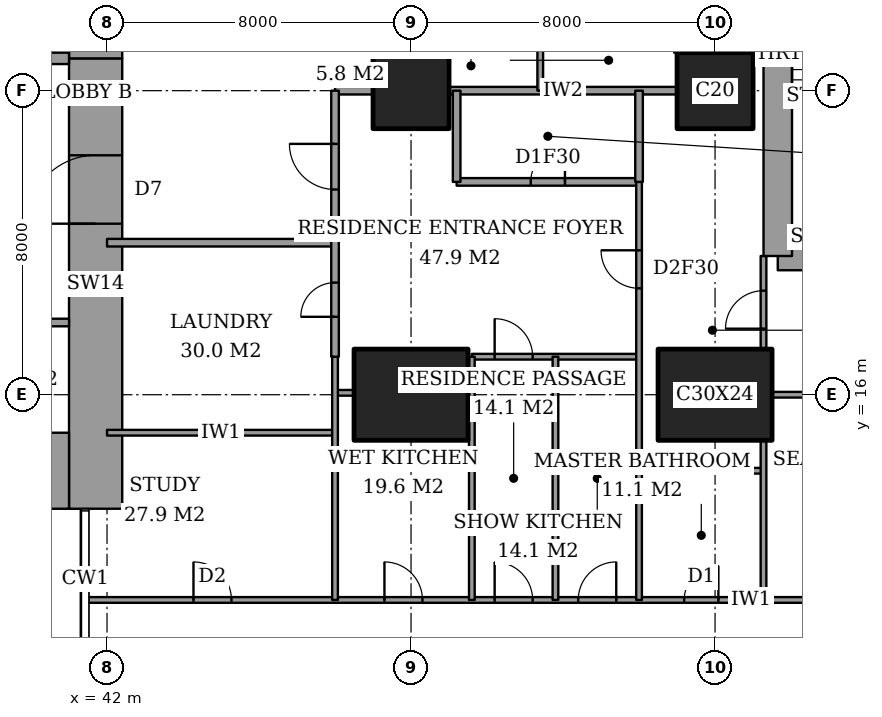
"""IFC4 building model, lengths in metres.
Left out: names, types, materials, properties, quantities, classifications, styles, units other than length and angle.
Written with IfcOpenShell. Run it as: python <this file> out.ifc"""

import sys

from ifc_helpers import new_model, si_unit, direction, frame, frame_2d, origin, origin_2d, place, context, subcontext, project, spatial, rectangle, extrude, element, fill, save


model = new_model("IFC4")
c1 = context("Model", 3, precision=1e-05, world=origin(), true_north=direction((0.0, 1.0)))
c2 = subcontext(c1, "Body", "Model", "MODEL_VIEW")
j1 = project(units=[si_unit("LENGTHUNIT", "METRE"), si_unit("PLANEANGLEUNIT", "RADIAN")], contexts=[c1])
p1 = place(None, origin())
s1 = spatial("IfcSite", under=j1, at=p1, CompositionType="ELEMENT")
p2 = place(p1, origin())
s2 = spatial("IfcBuilding", under=s1, at=p2, CompositionType="ELEMENT")
p3 = place(p2, frame((0.0, 0.0, 72.8)))
s3 = spatial("IfcBuildingStorey", under=s2, at=p3, CompositionType="ELEMENT", Elevation=72.8)
p4 = place(p3, frame((50.0, 16.0, 0.0), z_axis=(0.0, 0.0, 1.0), x_axis=(1.0, 0.0, 0.0)))
e1 = element("IfcColumn", 1, at=p4, inside=s3, PredefinedType="COLUMN", context=c2, shape_type="SweptSolid", body=[
    extrude(rectangle(XDim=3.0, YDim=2.4, at=origin_2d()), origin(), (0.0, 0.0, 1.0), 3.6),
])
p5 = place(p3, frame((50.0, 24.0, 0.0), z_axis=(0.0, 0.0, 1.0), x_axis=(1.0, 0.0, 0.0)))
e2 = element("IfcColumn", 2, at=p5, inside=s3, PredefinedType="COLUMN", context=c2, shape_type="SweptSolid", body=[
    extrude(rectangle(XDim=2.0, YDim=2.0, at=origin_2d()), origin(), (0.0, 0.0, 1.0), 3.6),
])
p6 = place(p3, frame((58.0, 16.0, 0.0), z_axis=(0.0, 0.0, 1.0), x_axis=(1.0, 0.0, 0.0)))
e3 = element("IfcColumn", 3, at=p6, inside=s3, PredefinedType="COLUMN", context=c2, shape_type="SweptSolid", body=[
    extrude(rectangle(XDim=3.0, YDim=2.4, at=origin_2d()), origin(), (0.0, 0.0, 1.0), 3.6),
])
p7 = place(p3, frame((58.0, 24.0, 0.0), z_axis=(0.0, 0.0, 1.0), x_axis=(1.0, 0.0, 0.0)))
e4 = element("IfcColumn", 4, at=p7, inside=s3, PredefinedType="COLUMN", context=c2, shape_type="SweptSolid", body=[
    extrude(rectangle(XDim=2.0, YDim=2.0, at=origin_2d()), origin(), (0.0, 0.0, 1.0), 3.6),
])
p8 = place(p3, frame((37.85, 14.0, 0.0), z_axis=(0.0, 0.0, 1.0), x_axis=(1.0, 0.0, 0.0)))
e5 = element("IfcWall", 5, at=p8, inside=s3, PredefinedType="SHEAR", context=c2, shape_type="SweptSolid", body=[
    extrude(rectangle(XDim=3.15, YDim=2.0, at=frame_2d((1.575, 0.0))), origin(), (0.0, 0.0, 1.0), 3.6),
])
p9 = place(p3, frame((41.7, 13.0, 0.0), z_axis=(0.0, 0.0, 1.0), x_axis=(0.0, 1.0, 0.0)))
e6 = element("IfcWall", 6, at=p9, inside=s3, PredefinedType="SHEAR", context=c2, shape_type="SweptSolid", body=[
    extrude(rectangle(XDim=11.85, YDim=1.4, at=frame_2d((5.925, 0.0))), origin(), (0.0, 0.0, 1.0), 3.6),
])
p10 = place(p9, frame((7.5, 0.0, 0.0)))
e7 = element("IfcOpeningElement", 7, at=p10, cuts=e6, PredefinedType="OPENING", context=c2, shape_type="SweptSolid", body=[
    extrude(rectangle(XDim=1.8, YDim=2.4, at=frame_2d((0.9, 1.2))), frame((0.0, 0.71, 0.0), z_axis=(0.0, -1.0, 0.0), x_axis=(1.0, 0.0, 0.0)), (0.0, 0.0, 1.0), 1.42),
])
p11 = place(p3, frame((41.7, 24.85, 0.0), z_axis=(0.0, 0.0, 1.0), x_axis=(0.0, 1.0, 0.0)))
e8 = element("IfcWall", 8, at=p11, inside=s3, PredefinedType="SHEAR", context=c2, shape_type="SweptSolid", body=[
    extrude(rectangle(XDim=10.15, YDim=1.4, at=frame_2d((5.075, 0.0))), origin(), (0.0, 0.0, 1.0), 3.6),
])
p12 = place(p3, frame((37.85, 24.85, 0.0), z_axis=(0.0, 0.0, 1.0), x_axis=(1.0, 0.0, 0.0)))
e9 = element("IfcWall", 9, at=p12, inside=s3, PredefinedType="SHEAR", context=c2, shape_type="SweptSolid", body=[
    extrude(rectangle(XDim=3.15, YDim=0.3, at=frame_2d((1.575, 0.0))), origin(), (0.0, 0.0, 1.0), 3.6),
])
p13 = place(p12, frame((0.95, 0.0, 0.0)))
e10 = element("IfcOpeningElement", 10, at=p13, cuts=e9, PredefinedType="OPENING", context=c2, shape_type="SweptSolid", body=[
    extrude(rectangle(XDim=1.0, YDim=2.1, at=frame_2d((0.5, 1.05))), frame((0.0, 0.16, 0.0), z_axis=(0.0, -1.0, 0.0), x_axis=(1.0, 0.0, 0.0)), (0.0, 0.0, 1.0), 0.32),
])
p14 = place(p3, frame((59.65, 19.65, 0.0), z_axis=(0.0, 0.0, 1.0), x_axis=(1.0, 0.0, 0.0)))
e11 = element("IfcWall", 11, at=p14, inside=s3, PredefinedType="SHEAR", context=c2, shape_type="SweptSolid", body=[
    extrude(rectangle(XDim=4.45, YDim=0.75, at=frame_2d((2.225, 0.0))), origin(), (0.0, 0.0, 1.0), 3.6),
])
p15 = place(p3, frame((59.65, 28.35, 0.0), z_axis=(0.0, 0.0, 1.0), x_axis=(0.0, -1.0, 0.0)))
e12 = element("IfcWall", 12, at=p15, inside=s3, PredefinedType="SHEAR", context=c2, shape_type="SweptSolid", body=[
    extrude(rectangle(XDim=8.7, YDim=0.75, at=frame_2d((4.35, 0.0))), origin(), (0.0, 0.0, 1.0), 3.6),
])
p16 = place(p15, frame((0.975, 0.0, 0.0)))
e13 = element("IfcOpeningElement", 13, at=p16, cuts=e12, PredefinedType="OPENING", context=c2, shape_type="SweptSolid", body=[
    extrude(rectangle(XDim=1.0, YDim=2.1, at=frame_2d((0.5, 1.05))), frame((0.0, 0.385, 0.0), z_axis=(0.0, -1.0, 0.0), x_axis=(1.0, 0.0, 0.0)), (0.0, 0.0, 1.0), 0.77),
])
p17 = place(p3, frame((41.439, 10.6, 0.0), z_axis=(0.0, 0.0, 1.0), x_axis=(1.0, 0.0, 0.0)))
e14 = element("IfcWall", 14, at=p17, inside=s3, PredefinedType="PARTITIONING", context=c2, shape_type="SweptSolid", body=[
    extrude(rectangle(XDim=25.011, YDim=0.15, at=frame_2d((12.505, 0.0))), origin(), (0.0, 0.0, 1.0), 3.35),
])
p18 = place(p17, frame((10.761, 0.0, 0.0)))
e15 = element("IfcOpeningElement", 15, at=p18, cuts=e14, PredefinedType="OPENING", context=c2, shape_type="SweptSolid", body=[
    extrude(rectangle(XDim=1.0, YDim=2.1, at=frame_2d((0.5, 1.05))), frame((0.0, 0.085, 0.0), z_axis=(0.0, -1.0, 0.0), x_axis=(1.0, 0.0, 0.0)), (0.0, 0.0, 1.0), 0.17),
])
p19 = place(p17, frame((20.924, 0.0, 0.0)))
e16 = element("IfcOpeningElement", 16, at=p19, cuts=e14, PredefinedType="OPENING", context=c2, shape_type="SweptSolid", body=[
    extrude(rectangle(XDim=1.0, YDim=2.1, at=frame_2d((0.5, 1.05))), frame((0.0, 0.085, 0.0), z_axis=(0.0, -1.0, 0.0), x_axis=(1.0, 0.0, 0.0)), (0.0, 0.0, 1.0), 0.17),
])
p20 = place(p17, frame((15.749, 0.0, 0.0)))
e17 = element("IfcOpeningElement", 17, at=p20, cuts=e14, PredefinedType="OPENING", context=c2, shape_type="SweptSolid", body=[
    extrude(rectangle(XDim=0.9, YDim=2.1, at=frame_2d((0.45, 1.05))), frame((0.0, 0.085, 0.0), z_axis=(0.0, -1.0, 0.0), x_axis=(1.0, 0.0, 0.0)), (0.0, 0.0, 1.0), 0.17),
])
p21 = place(p17, frame((12.961, 0.0, 0.0)))
e18 = element("IfcOpeningElement", 18, at=p21, cuts=e14, PredefinedType="OPENING", context=c2, shape_type="SweptSolid", body=[
    extrude(rectangle(XDim=1.0, YDim=2.1, at=frame_2d((0.5, 1.05))), frame((0.0, 0.085, 0.0), z_axis=(0.0, -1.0, 0.0), x_axis=(1.0, 0.0, 0.0)), (0.0, 0.0, 1.0), 0.17),
])
p22 = place(p17, frame((7.861, 0.0, 0.0)))
e19 = element("IfcOpeningElement", 19, at=p22, cuts=e14, PredefinedType="OPENING", context=c2, shape_type="SweptSolid", body=[
    extrude(rectangle(XDim=1.0, YDim=2.1, at=frame_2d((0.5, 1.05))), frame((0.0, 0.085, 0.0), z_axis=(0.0, -1.0, 0.0), x_axis=(1.0, 0.0, 0.0)), (0.0, 0.0, 1.0), 0.17),
])
p23 = place(p17, frame((2.836, 0.0, 0.0)))
e20 = element("IfcOpeningElement", 20, at=p23, cuts=e14, PredefinedType="OPENING", context=c2, shape_type="SweptSolid", body=[
    extrude(rectangle(XDim=1.0, YDim=2.1, at=frame_2d((0.5, 1.05))), frame((0.0, 0.085, 0.0), z_axis=(0.0, -1.0, 0.0), x_axis=(1.0, 0.0, 0.0)), (0.0, 0.0, 1.0), 0.17),
])
p24 = place(p3, frame((56.0, 14.0, 0.0), z_axis=(0.0, 0.0, 1.0), x_axis=(1.0, 0.0, 0.0)))
e21 = element("IfcWall", 21, at=p24, inside=s3, PredefinedType="PARTITIONING", context=c2, shape_type="SweptSolid", body=[
    extrude(rectangle(XDim=3.275, YDim=0.15, at=frame_2d((1.637, 0.0))), origin(), (0.0, 0.0, 1.0), 3.35),
])
p25 = place(p3, frame((42.0, 15.0, 0.0), z_axis=(0.0, 0.0, 1.0), x_axis=(1.0, 0.0, 0.0)))
e22 = element("IfcWall", 22, at=p25, inside=s3, PredefinedType="PARTITIONING", context=c2, shape_type="SweptSolid", body=[
    extrude(rectangle(XDim=6.0, YDim=0.15, at=frame_2d((3.0, 0.0))), origin(), (0.0, 0.0, 1.0), 3.35),
])
p26 = place(p3, frame((59.5, 16.0, 0.0), z_axis=(0.0, 0.0, 1.0), x_axis=(1.0, 0.0, 0.0)))
e23 = element("IfcWall", 23, at=p26, inside=s3, PredefinedType="PARTITIONING", context=c2, shape_type="SweptSolid", body=[
    extrude(rectangle(XDim=5.15, YDim=0.15, at=frame_2d((2.575, 0.0))), origin(), (0.0, 0.0, 1.0), 2.634),
])
p27 = place(p3, frame((48.0, 16.05, 0.0), z_axis=(0.0, 0.0, 1.0), x_axis=(1.0, 0.0, 0.0)))
e24 = element("IfcWall", 24, at=p27, inside=s3, PredefinedType="PARTITIONING", context=c2, shape_type="SweptSolid", body=[
    extrude(rectangle(XDim=0.5, YDim=0.15, at=frame_2d((0.25, 0.0))), origin(), (0.0, 0.0, 1.0), 2.634),
])
p28 = place(p3, frame((51.6, 17.0, 0.0), z_axis=(0.0, 0.0, 1.0), x_axis=(1.0, 0.0, 0.0)))
e25 = element("IfcWall", 25, at=p28, inside=s3, PredefinedType="PARTITIONING", context=c2, shape_type="SweptSolid", body=[
    extrude(rectangle(XDim=4.4, YDim=0.15, at=frame_2d((2.2, 0.0))), origin(), (0.0, 0.0, 1.0), 3.35),
])
p29 = place(p28, frame((0.6, 0.0, 0.0)))
e26 = element("IfcOpeningElement", 26, at=p29, cuts=e25, PredefinedType="OPENING", context=c2, shape_type="SweptSolid", body=[
    extrude(rectangle(XDim=1.0, YDim=2.1, at=frame_2d((0.5, 1.05))), frame((0.0, 0.085, 0.0), z_axis=(0.0, -1.0, 0.0), x_axis=(1.0, 0.0, 0.0)), (0.0, 0.0, 1.0), 0.17),
])
p30 = place(p3, frame((42.0, 20.0, 0.0), z_axis=(0.0, 0.0, 1.0), x_axis=(1.0, 0.0, 0.0)))
e27 = element("IfcWall", 27, at=p30, inside=s3, PredefinedType="PARTITIONING", context=c2, shape_type="SweptSolid", body=[
    extrude(rectangle(XDim=6.0, YDim=0.2, at=frame_2d((3.0, 0.0))), origin(), (0.0, 0.0, 1.0), 3.35),
])
p31 = place(p3, frame((51.2, 21.6, 0.0), z_axis=(0.0, 0.0, 1.0), x_axis=(1.0, 0.0, 0.0)))
e28 = element("IfcWall", 28, at=p31, inside=s3, PredefinedType="PARTITIONING", context=c2, shape_type="SweptSolid", body=[
    extrude(rectangle(XDim=4.8, YDim=0.2, at=frame_2d((2.4, 0.0))), origin(), (0.0, 0.0, 1.0), 3.35),
])
p32 = place(p31, frame((1.95, 0.0, 0.0)))
e29 = element("IfcOpeningElement", 29, at=p32, cuts=e28, PredefinedType="OPENING", context=c2, shape_type="SweptSolid", body=[
    extrude(rectangle(XDim=0.9, YDim=2.1, at=frame_2d((0.45, 1.05))), frame((0.0, 0.11, 0.0), z_axis=(0.0, -1.0, 0.0), x_axis=(1.0, 0.0, 0.0)), (0.0, 0.0, 1.0), 0.22),
])
p33 = place(p3, frame((48.0, 24.0, 0.0), z_axis=(0.0, 0.0, 1.0), x_axis=(1.0, 0.0, 0.0)))
e30 = element("IfcWall", 30, at=p33, inside=s3, PredefinedType="PARTITIONING", context=c2, shape_type="SweptSolid", body=[
    extrude(rectangle(XDim=1.0, YDim=0.2, at=frame_2d((0.5, 0.0))), origin(), (0.0, 0.0, 1.0), 3.35),
])
p34 = place(p3, frame((51.0, 24.0, 0.0), z_axis=(0.0, 0.0, 1.0), x_axis=(1.0, 0.0, 0.0)))
e31 = element("IfcWall", 31, at=p34, inside=s3, PredefinedType="PARTITIONING", context=c2, shape_type="SweptSolid", body=[
    extrude(rectangle(XDim=6.0, YDim=0.2, at=frame_2d((3.0, 0.0))), origin(), (0.0, 0.0, 1.0), 3.35),
])
p35 = place(p3, frame((48.0, 17.0, 0.0), z_axis=(0.0, 0.0, 1.0), x_axis=(0.0, 1.0, 0.0)))
e32 = element("IfcWall", 32, at=p35, inside=s3, PredefinedType="PARTITIONING", context=c2, shape_type="SweptSolid", body=[
    extrude(rectangle(XDim=7.0, YDim=0.2, at=frame_2d((3.5, 0.0))), origin(), (0.0, 0.0, 1.0), 3.35),
])
p36 = place(p35, frame((4.4, 0.0, 0.0)))
e33 = element("IfcOpeningElement", 33, at=p36, cuts=e32, PredefinedType="OPENING", context=c2, shape_type="SweptSolid", body=[
    extrude(rectangle(XDim=1.2, YDim=2.4, at=frame_2d((0.6, 1.2))), frame((0.0, 0.11, 0.0), z_axis=(0.0, -1.0, 0.0), x_axis=(1.0, 0.0, 0.0)), (0.0, 0.0, 1.0), 0.22),
])
p37 = place(p35, frame((1.05, 0.0, 0.0)))
e34 = element("IfcOpeningElement", 34, at=p37, cuts=e32, PredefinedType="OPENING", context=c2, shape_type="SweptSolid", body=[
    extrude(rectangle(XDim=0.9, YDim=2.1, at=frame_2d((0.45, 1.05))), frame((0.0, 0.11, 0.0), z_axis=(0.0, -1.0, 0.0), x_axis=(1.0, 0.0, 0.0)), (0.0, 0.0, 1.0), 0.22),
])
p38 = place(p3, frame((48.0, 10.6, 0.0), z_axis=(0.0, 0.0, 1.0), x_axis=(0.0, 1.0, 0.0)))
e35 = element("IfcWall", 35, at=p38, inside=s3, PredefinedType="PARTITIONING", context=c2, shape_type="SweptSolid", body=[
    extrude(rectangle(XDim=6.4, YDim=0.15, at=frame_2d((3.2, 0.0))), origin(), (0.0, 0.0, 1.0), 3.35),
])
p39 = place(p3, frame((51.2, 21.6, 0.0), z_axis=(0.0, 0.0, 1.0), x_axis=(0.0, 1.0, 0.0)))
e36 = element("IfcWall", 36, at=p39, inside=s3, PredefinedType="PARTITIONING", context=c2, shape_type="SweptSolid", body=[
    extrude(rectangle(XDim=2.4, YDim=0.2, at=frame_2d((1.2, 0.0))), origin(), (0.0, 0.0, 1.0), 3.35),
])
p40 = place(p3, frame((51.6, 10.6, 0.0), z_axis=(0.0, 0.0, 1.0), x_axis=(0.0, 1.0, 0.0)))
e37 = element("IfcWall", 37, at=p40, inside=s3, PredefinedType="PARTITIONING", context=c2, shape_type="SweptSolid", body=[
    extrude(rectangle(XDim=6.4, YDim=0.15, at=frame_2d((3.2, 0.0))), origin(), (0.0, 0.0, 1.0), 3.35),
])
p41 = place(p3, frame((53.4, 24.0, 0.0), z_axis=(0.0, 0.0, 1.0), x_axis=(0.0, 1.0, 0.0)))
e38 = element("IfcWall", 38, at=p41, inside=s3, PredefinedType="PARTITIONING", context=c2, shape_type="SweptSolid", body=[
    extrude(rectangle(XDim=1.6, YDim=0.15, at=frame_2d((0.8, 0.0))), origin(), (0.0, 0.0, 1.0), 3.35),
])
p42 = place(p3, frame((53.8, 10.6, 0.0), z_axis=(0.0, 0.0, 1.0), x_axis=(0.0, 1.0, 0.0)))
e39 = element("IfcWall", 39, at=p42, inside=s3, PredefinedType="PARTITIONING", context=c2, shape_type="SweptSolid", body=[
    extrude(rectangle(XDim=6.4, YDim=0.15, at=frame_2d((3.2, 0.0))), origin(), (0.0, 0.0, 1.0), 3.35),
])
p43 = place(p3, frame((56.0, 21.6, 0.0), z_axis=(0.0, 0.0, 1.0), x_axis=(0.0, 1.0, 0.0)))
e40 = element("IfcWall", 40, at=p43, inside=s3, PredefinedType="PARTITIONING", context=c2, shape_type="SweptSolid", body=[
    extrude(rectangle(XDim=2.4, YDim=0.2, at=frame_2d((1.2, 0.0))), origin(), (0.0, 0.0, 1.0), 3.35),
])
p44 = place(p3, frame((56.0, 10.6, 0.0), z_axis=(0.0, 0.0, 1.0), x_axis=(0.0, 1.0, 0.0)))
e41 = element("IfcWall", 41, at=p44, inside=s3, PredefinedType="PARTITIONING", context=c2, shape_type="SweptSolid", body=[
    extrude(rectangle(XDim=11.0, YDim=0.15, at=frame_2d((5.5, 0.0))), origin(), (0.0, 0.0, 1.0), 3.35),
])
p45 = place(p44, frame((8.2, 0.0, 0.0)))
e42 = element("IfcOpeningElement", 42, at=p45, cuts=e41, PredefinedType="OPENING", context=c2, shape_type="SweptSolid", body=[
    extrude(rectangle(XDim=1.0, YDim=2.1, at=frame_2d((0.5, 1.05))), frame((0.0, 0.085, 0.0), z_axis=(0.0, -1.0, 0.0), x_axis=(1.0, 0.0, 0.0)), (0.0, 0.0, 1.0), 0.17),
])
p46 = place(p3, frame((59.275, 10.6, 0.0), z_axis=(0.0, 0.0, 1.0), x_axis=(0.0, 1.0, 0.0)))
e43 = element("IfcWall", 43, at=p46, inside=s3, PredefinedType="PARTITIONING", context=c2, shape_type="SweptSolid", body=[
    extrude(rectangle(XDim=4.2, YDim=0.15, at=frame_2d((2.1, 0.0))), origin(), (0.0, 0.0, 1.0), 3.35),
])
p47 = place(p3, frame((59.275, 17.2, 0.0), z_axis=(0.0, 0.0, 1.0), x_axis=(0.0, 1.0, 0.0)))
e44 = element("IfcWall", 44, at=p47, inside=s3, PredefinedType="PARTITIONING", context=c2, shape_type="SweptSolid", body=[
    extrude(rectangle(XDim=2.45, YDim=0.15, at=frame_2d((1.225, 0.0))), origin(), (0.0, 0.0, 1.0), 3.35),
])
p48 = place(p47, frame((0.538, 0.0, 0.0)))
e45 = element("IfcOpeningElement", 45, at=p48, cuts=e44, PredefinedType="OPENING", context=c2, shape_type="SweptSolid", body=[
    extrude(rectangle(XDim=1.0, YDim=2.1, at=frame_2d((0.5, 1.05))), frame((0.0, 0.085, 0.0), z_axis=(0.0, -1.0, 0.0), x_axis=(1.0, 0.0, 0.0)), (0.0, 0.0, 1.0), 0.17),
])
p49 = place(p3, frame((28.3, 17.9, 0.0), z_axis=(0.0, 0.0, 1.0), x_axis=(1.0, 0.0, 0.0)))
e46 = element("IfcWall", 46, at=p49, inside=s3, PredefinedType="PARTITIONING", context=c2, shape_type="SweptSolid", body=[
    extrude(rectangle(XDim=12.7, YDim=0.2, at=frame_2d((6.35, 0.0))), origin(), (0.0, 0.0, 1.0), 3.6),
])
p50 = place(p49, frame((0.95, 0.0, 0.0)))
e47 = element("IfcOpeningElement", 47, at=p50, cuts=e46, PredefinedType="OPENING", context=c2, shape_type="SweptSolid", body=[
    extrude(rectangle(XDim=1.1, YDim=2.1, at=frame_2d((0.55, 1.05))), frame((0.0, 0.11, 0.0), z_axis=(0.0, -1.0, 0.0), x_axis=(1.0, 0.0, 0.0)), (0.0, 0.0, 1.0), 0.22),
])
p51 = place(p49, frame((4.15, 0.0, 0.0)))
e48 = element("IfcOpeningElement", 48, at=p51, cuts=e46, PredefinedType="OPENING", context=c2, shape_type="SweptSolid", body=[
    extrude(rectangle(XDim=1.1, YDim=2.1, at=frame_2d((0.55, 1.05))), frame((0.0, 0.11, 0.0), z_axis=(0.0, -1.0, 0.0), x_axis=(1.0, 0.0, 0.0)), (0.0, 0.0, 1.0), 0.22),
])
p52 = place(p49, frame((7.35, 0.0, 0.0)))
e49 = element("IfcOpeningElement", 49, at=p52, cuts=e46, PredefinedType="OPENING", context=c2, shape_type="SweptSolid", body=[
    extrude(rectangle(XDim=1.1, YDim=2.1, at=frame_2d((0.55, 1.05))), frame((0.0, 0.11, 0.0), z_axis=(0.0, -1.0, 0.0), x_axis=(1.0, 0.0, 0.0)), (0.0, 0.0, 1.0), 0.22),
])
p53 = place(p49, frame((10.6, 0.0, 0.0)))
e50 = element("IfcOpeningElement", 50, at=p53, cuts=e46, PredefinedType="OPENING", context=c2, shape_type="SweptSolid", body=[
    extrude(rectangle(XDim=1.2, YDim=2.1, at=frame_2d((0.6, 1.05))), frame((0.0, 0.11, 0.0), z_axis=(0.0, -1.0, 0.0), x_axis=(1.0, 0.0, 0.0)), (0.0, 0.0, 1.0), 0.22),
])
p54 = place(p18, origin())
e51 = element("IfcDoor", 51, at=p54, inside=s3, OperationType="SINGLE_SWING_RIGHT", PredefinedType="DOOR", context=c2, shape_type="SweptSolid", body=[
    extrude(rectangle(XDim=1.0, YDim=2.1, at=frame_2d((0.5, 1.05))), frame((0.0, 0.025, 0.0), z_axis=(0.0, -1.0, 0.0), x_axis=(1.0, 0.0, 0.0)), (0.0, 0.0, 1.0), 0.05),
])
fill(e15, e51)
p55 = place(p48, origin())
e52 = element("IfcDoor", 52, at=p55, inside=s3, OperationType="SINGLE_SWING_RIGHT", PredefinedType="DOOR", context=c2, shape_type="SweptSolid", body=[
    extrude(rectangle(XDim=1.0, YDim=2.1, at=frame_2d((0.5, 1.05))), frame((0.0, 0.025, 0.0), z_axis=(0.0, -1.0, 0.0), x_axis=(1.0, 0.0, 0.0)), (0.0, 0.0, 1.0), 0.05),
])
fill(e45, e52)
p56 = place(p20, origin())
e53 = element("IfcDoor", 53, at=p56, inside=s3, OperationType="SINGLE_SWING_LEFT", PredefinedType="DOOR", context=c2, shape_type="SweptSolid", body=[
    extrude(rectangle(XDim=0.9, YDim=2.1, at=frame_2d((0.45, 1.05))), frame((0.0, 0.025, 0.0), z_axis=(0.0, -1.0, 0.0), x_axis=(1.0, 0.0, 0.0)), (0.0, 0.0, 1.0), 0.05),
])
fill(e17, e53)
p57 = place(p45, origin())
e54 = element("IfcDoor", 54, at=p57, inside=s3, OperationType="SINGLE_SWING_LEFT", PredefinedType="DOOR", context=c2, shape_type="SweptSolid", body=[
    extrude(rectangle(XDim=1.0, YDim=2.1, at=frame_2d((0.5, 1.05))), frame((0.0, 0.025, 0.0), z_axis=(0.0, -1.0, 0.0), x_axis=(1.0, 0.0, 0.0)), (0.0, 0.0, 1.0), 0.05),
])
fill(e42, e54)
p58 = place(p32, origin())
e55 = element("IfcDoor", 55, at=p58, inside=s3, OperationType="SINGLE_SWING_LEFT", PredefinedType="DOOR", context=c2, shape_type="SweptSolid", body=[
    extrude(rectangle(XDim=0.9, YDim=2.1, at=frame_2d((0.45, 1.05))), frame((0.0, 0.025, 0.0), z_axis=(0.0, -1.0, 0.0), x_axis=(1.0, 0.0, 0.0)), (0.0, 0.0, 1.0), 0.05),
])
fill(e29, e55)
p59 = place(p36, origin())
e56 = element("IfcDoor", 56, at=p59, inside=s3, OperationType="SINGLE_SWING_LEFT", PredefinedType="DOOR", context=c2, shape_type="SweptSolid", body=[
    extrude(rectangle(XDim=1.2, YDim=2.4, at=frame_2d((0.6, 1.2))), frame((0.0, 0.025, 0.0), z_axis=(0.0, -1.0, 0.0), x_axis=(1.0, 0.0, 0.0)), (0.0, 0.0, 1.0), 0.05),
])
fill(e33, e56)
p60 = place(p21, origin())
e57 = element("IfcDoor", 57, at=p60, inside=s3, OperationType="SINGLE_SWING_LEFT", PredefinedType="DOOR", context=c2, shape_type="SweptSolid", body=[
    extrude(rectangle(XDim=1.0, YDim=2.1, at=frame_2d((0.5, 1.05))), frame((0.0, 0.025, 0.0), z_axis=(0.0, -1.0, 0.0), x_axis=(1.0, 0.0, 0.0)), (0.0, 0.0, 1.0), 0.05),
])
fill(e18, e57)
p61 = place(p29, origin())
e58 = element("IfcDoor", 58, at=p61, inside=s3, OperationType="SINGLE_SWING_RIGHT", PredefinedType="DOOR", context=c2, shape_type="SweptSolid", body=[
    extrude(rectangle(XDim=1.0, YDim=2.1, at=frame_2d((0.5, 1.05))), frame((0.0, 0.025, 0.0), z_axis=(0.0, -1.0, 0.0), x_axis=(1.0, 0.0, 0.0)), (0.0, 0.0, 1.0), 0.05),
])
fill(e26, e58)
p62 = place(p22, origin())
e59 = element("IfcDoor", 59, at=p62, inside=s3, OperationType="SINGLE_SWING_RIGHT", PredefinedType="DOOR", context=c2, shape_type="SweptSolid", body=[
    extrude(rectangle(XDim=1.0, YDim=2.1, at=frame_2d((0.5, 1.05))), frame((0.0, 0.025, 0.0), z_axis=(0.0, -1.0, 0.0), x_axis=(1.0, 0.0, 0.0)), (0.0, 0.0, 1.0), 0.05),
])
fill(e19, e59)
p63 = place(p23, origin())
e60 = element("IfcDoor", 60, at=p63, inside=s3, OperationType="SINGLE_SWING_RIGHT", PredefinedType="DOOR", context=c2, shape_type="SweptSolid", body=[
    extrude(rectangle(XDim=1.0, YDim=2.1, at=frame_2d((0.5, 1.05))), frame((0.0, 0.025, 0.0), z_axis=(0.0, -1.0, 0.0), x_axis=(1.0, 0.0, 0.0)), (0.0, 0.0, 1.0), 0.05),
])
fill(e20, e60)
p64 = place(p37, origin())
e61 = element("IfcDoor", 61, at=p64, inside=s3, OperationType="SINGLE_SWING_RIGHT", PredefinedType="DOOR", context=c2, shape_type="SweptSolid", body=[
    extrude(rectangle(XDim=0.9, YDim=2.1, at=frame_2d((0.45, 1.05))), frame((0.0, 0.025, 0.0), z_axis=(0.0, -1.0, 0.0), x_axis=(1.0, 0.0, 0.0)), (0.0, 0.0, 1.0), 0.05),
])
fill(e34, e61)
p65 = place(p10, origin())
e62 = element("IfcDoor", 62, at=p65, inside=s3, OperationType="DOUBLE_DOOR_DOUBLE_SWING", PredefinedType="DOOR", context=c2, shape_type="SweptSolid", body=[
    extrude(rectangle(XDim=1.8, YDim=2.4, at=frame_2d((0.9, 1.2))), frame((0.0, 0.025, 0.0), z_axis=(0.0, -1.0, 0.0), x_axis=(1.0, 0.0, 0.0)), (0.0, 0.0, 1.0), 0.05),
])
fill(e7, e62)
save(model, sys.argv[1])
